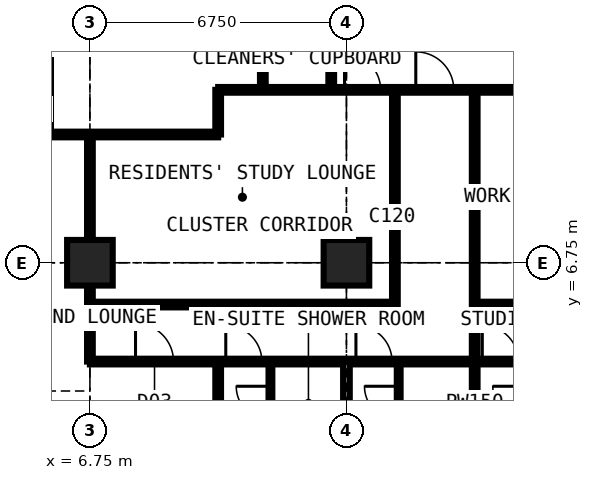
"""IFC4 building model, lengths in metres.
Left out: names, types, materials, properties, quantities, classifications, styles, units other than length and angle.
Written with IfcOpenShell. Run it as: python <this file> out.ifc"""

import sys

from ifc_helpers import new_model, si_unit, direction, frame, frame_2d, origin, origin_2d, place, context, subcontext, project, spatial, rectangle, extrude, element, fill, save


model = new_model("IFC4")
c1 = context("Model", 3, precision=1e-05, world=origin(), true_north=direction((0.0, 1.0)))
c2 = subcontext(c1, "Body", "Model", "MODEL_VIEW")
j1 = project(units=[si_unit("LENGTHUNIT", "METRE"), si_unit("PLANEANGLEUNIT", "RADIAN")], contexts=[c1])
p1 = place(None, origin())
s1 = spatial("IfcSite", under=j1, at=p1, CompositionType="ELEMENT")
p2 = place(p1, origin())
s2 = spatial("IfcBuilding", under=s1, at=p2, CompositionType="ELEMENT")
p3 = place(p2, frame((0.0, 0.0, 185.4)))
s3 = spatial("IfcBuildingStorey", under=s2, at=p3, CompositionType="ELEMENT", Elevation=185.4)
for number, where, z_axis, x_axis in (
    (1, (6.75, 6.75, 0.0), (0.0, 0.0, 1.0), (1.0, 0.0, 0.0)),
    (2, (13.5, 6.75, 0.0), (0.0, 0.0, 1.0), (1.0, 0.0, 0.0)),
):
    element("IfcColumn", number, at=place(p3, frame(where, z_axis=z_axis, x_axis=x_axis)), inside=s3, PredefinedType="COLUMN", context=c2, shape_type="SweptSolid", body=[
        extrude(rectangle(XDim=1.2, YDim=1.2, at=origin_2d()), origin(), (0.0, 0.0, 1.0), 3.6),
    ])
p4 = place(p3, frame((-0.734, 10.125, 0.0), z_axis=(0.0, 0.0, 1.0), x_axis=(1.0, 0.0, 0.0)))
e3 = element("IfcWall", 3, at=p4, inside=s3, PredefinedType="PARTITIONING", context=c2, shape_type="SweptSolid", body=[
    extrude(rectangle(XDim=10.859, YDim=0.15, at=frame_2d((5.429, 0.0))), origin(), (0.0, 0.0, 1.0), 3.375),
])
p5 = place(p3, frame((6.75, 4.15, 0.0), z_axis=(0.0, 0.0, 1.0), x_axis=(0.0, 1.0, 0.0)))
e4 = element("IfcWall", 4, at=p5, inside=s3, PredefinedType="PARTITIONING", context=c2, shape_type="SweptSolid", body=[
    extrude(rectangle(XDim=5.975, YDim=0.15, at=frame_2d((2.988, 0.0))), origin(), (0.0, 0.0, 1.0), 2.877),
])
p6 = place(p3, frame((6.75, 4.15, 0.0), z_axis=(0.0, 0.0, 1.0), x_axis=(1.0, 0.0, 0.0)))
e5 = element("IfcWall", 5, at=p6, inside=s3, PredefinedType="PARTITIONING", context=c2, shape_type="SweptSolid", body=[
    extrude(rectangle(XDim=20.25, YDim=0.15, at=frame_2d((10.125, 0.0))), origin(), (0.0, 0.0, 1.0), 3.375),
])
p7 = place(p6, frame((1.2, 0.0, 0.0)))
e6 = element("IfcOpeningElement", 6, at=p7, cuts=e5, PredefinedType="OPENING", context=c2, shape_type="SweptSolid", body=[
    extrude(rectangle(XDim=1.0, YDim=2.2, at=frame_2d((0.5, 1.1))), frame((0.0, 0.085, 0.0), z_axis=(0.0, -1.0, 0.0), x_axis=(1.0, 0.0, 0.0)), (0.0, 0.0, 1.0), 0.17),
])
p8 = place(p6, frame((3.575, 0.0, 0.0)))
e7 = element("IfcOpeningElement", 7, at=p8, cuts=e5, PredefinedType="OPENING", context=c2, shape_type="SweptSolid", body=[
    extrude(rectangle(XDim=0.95, YDim=2.2, at=frame_2d((0.475, 1.1))), frame((0.0, 0.085, 0.0), z_axis=(0.0, -1.0, 0.0), x_axis=(1.0, 0.0, 0.0)), (0.0, 0.0, 1.0), 0.17),
])
p9 = place(p6, frame((7.0, 0.0, 0.0)))
e8 = element("IfcOpeningElement", 8, at=p9, cuts=e5, PredefinedType="OPENING", context=c2, shape_type="SweptSolid", body=[
    extrude(rectangle(XDim=0.95, YDim=2.2, at=frame_2d((0.475, 1.1))), frame((0.0, 0.085, 0.0), z_axis=(0.0, -1.0, 0.0), x_axis=(1.0, 0.0, 0.0)), (0.0, 0.0, 1.0), 0.17),
])
p10 = place(p6, frame((10.325, 0.0, 0.0)))
e9 = element("IfcOpeningElement", 9, at=p10, cuts=e5, PredefinedType="OPENING", context=c2, shape_type="SweptSolid", body=[
    extrude(rectangle(XDim=0.95, YDim=2.2, at=frame_2d((0.475, 1.1))), frame((0.0, 0.085, 0.0), z_axis=(0.0, -1.0, 0.0), x_axis=(1.0, 0.0, 0.0)), (0.0, 0.0, 1.0), 0.17),
])
p11 = place(p6, frame((13.75, 0.0, 0.0)))
e10 = element("IfcOpeningElement", 10, at=p11, cuts=e5, PredefinedType="OPENING", context=c2, shape_type="SweptSolid", body=[
    extrude(rectangle(XDim=0.95, YDim=2.2, at=frame_2d((0.475, 1.1))), frame((0.0, 0.085, 0.0), z_axis=(0.0, -1.0, 0.0), x_axis=(1.0, 0.0, 0.0)), (0.0, 0.0, 1.0), 0.17),
])
p12 = place(p6, frame((17.125, 0.0, 0.0)))
e11 = element("IfcOpeningElement", 11, at=p12, cuts=e5, PredefinedType="OPENING", context=c2, shape_type="SweptSolid", body=[
    extrude(rectangle(XDim=0.95, YDim=2.2, at=frame_2d((0.475, 1.1))), frame((0.0, 0.085, 0.0), z_axis=(0.0, -1.0, 0.0), x_axis=(1.0, 0.0, 0.0)), (0.0, 0.0, 1.0), 0.17),
])
p13 = place(p3, frame((6.75, 5.65, 0.0), z_axis=(0.0, 0.0, 1.0), x_axis=(1.0, 0.0, 0.0)))
e12 = element("IfcWall", 12, at=p13, inside=s3, PredefinedType="PARTITIONING", context=c2, shape_type="SweptSolid", body=[
    extrude(rectangle(XDim=8.025, YDim=0.15, at=frame_2d((4.012, 0.0))), origin(), (0.0, 0.0, 1.0), 3.375),
])
p14 = place(p3, frame((10.125, -0.734, 0.0), z_axis=(0.0, 0.0, 1.0), x_axis=(0.0, 1.0, 0.0)))
e13 = element("IfcWall", 13, at=p14, inside=s3, PredefinedType="PARTITIONING", context=c2, shape_type="SweptSolid", body=[
    extrude(rectangle(XDim=4.884, YDim=0.15, at=frame_2d((2.442, 0.0))), origin(), (0.0, 0.0, 1.0), 3.375),
])
p15 = place(p3, frame((10.125, 10.125, 0.0), z_axis=(0.0, 0.0, 1.0), x_axis=(0.0, 1.0, 0.0)))
e14 = element("IfcWall", 14, at=p15, inside=s3, PredefinedType="PARTITIONING", context=c2, shape_type="SweptSolid", body=[
    extrude(rectangle(XDim=1.175, YDim=0.15, at=frame_2d((0.587, 0.0))), origin(), (0.0, 0.0, 1.0), 3.375),
])
p16 = place(p3, frame((10.125, 11.3, 0.0), z_axis=(0.0, 0.0, 1.0), x_axis=(1.0, 0.0, 0.0)))
e15 = element("IfcWall", 15, at=p16, inside=s3, PredefinedType="PARTITIONING", context=c2, shape_type="SweptSolid", body=[
    extrude(rectangle(XDim=20.25, YDim=0.15, at=frame_2d((10.125, 0.0))), origin(), (0.0, 0.0, 1.0), 3.375),
])
p17 = place(p16, frame((5.2, 0.0, 0.0)))
e16 = element("IfcOpeningElement", 16, at=p17, cuts=e15, PredefinedType="OPENING", context=c2, shape_type="SweptSolid", body=[
    extrude(rectangle(XDim=1.0, YDim=2.2, at=frame_2d((0.5, 1.1))), frame((0.0, 0.085, 0.0), z_axis=(0.0, -1.0, 0.0), x_axis=(1.0, 0.0, 0.0)), (0.0, 0.0, 1.0), 0.17),
])
p18 = place(p16, frame((11.312, 0.0, 0.0)))
e17 = element("IfcOpeningElement", 17, at=p18, cuts=e15, PredefinedType="OPENING", context=c2, shape_type="SweptSolid", body=[
    extrude(rectangle(XDim=1.0, YDim=2.2, at=frame_2d((0.5, 1.1))), frame((0.0, 0.085, 0.0), z_axis=(0.0, -1.0, 0.0), x_axis=(1.0, 0.0, 0.0)), (0.0, 0.0, 1.0), 0.17),
])
p19 = place(p16, frame((3.325, 0.0, 0.0)))
e18 = element("IfcOpeningElement", 18, at=p19, cuts=e15, PredefinedType="OPENING", context=c2, shape_type="SweptSolid", body=[
    extrude(rectangle(XDim=0.95, YDim=2.2, at=frame_2d((0.475, 1.1))), frame((0.0, 0.085, 0.0), z_axis=(0.0, -1.0, 0.0), x_axis=(1.0, 0.0, 0.0)), (0.0, 0.0, 1.0), 0.17),
])
p20 = place(p3, frame((11.3, 11.3, 0.0), z_axis=(0.0, 0.0, 1.0), x_axis=(0.0, 1.0, 0.0)))
e19 = element("IfcWall", 19, at=p20, inside=s3, PredefinedType="PARTITIONING", context=c2, shape_type="SweptSolid", body=[
    extrude(rectangle(XDim=19.3, YDim=0.15, at=frame_2d((9.65, 0.0))), origin(), (0.0, 0.0, 1.0), 3.375),
])
p21 = place(p20, frame((18.1, 0.0, 0.0)))
e20 = element("IfcOpeningElement", 20, at=p21, cuts=e19, PredefinedType="OPENING", context=c2, shape_type="SweptSolid", body=[
    extrude(rectangle(XDim=1.0, YDim=2.2, at=frame_2d((0.5, 1.1))), frame((0.0, 0.085, 0.0), z_axis=(0.0, -1.0, 0.0), x_axis=(1.0, 0.0, 0.0)), (0.0, 0.0, 1.0), 0.17),
])
p22 = place(p20, frame((10.137, 0.0, 0.0)))
e21 = element("IfcOpeningElement", 21, at=p22, cuts=e19, PredefinedType="OPENING", context=c2, shape_type="SweptSolid", body=[
    extrude(rectangle(XDim=1.0, YDim=2.2, at=frame_2d((0.5, 1.1))), frame((0.0, 0.085, 0.0), z_axis=(0.0, -1.0, 0.0), x_axis=(1.0, 0.0, 0.0)), (0.0, 0.0, 1.0), 0.17),
])
p23 = place(p3, frame((11.5, 1.95, 0.0), z_axis=(0.0, 0.0, 1.0), x_axis=(0.0, 1.0, 0.0)))
e22 = element("IfcWall", 22, at=p23, inside=s3, PredefinedType="PARTITIONING", context=c2, shape_type="SweptSolid", body=[
    extrude(rectangle(XDim=2.2, YDim=0.1, at=frame_2d((1.1, 0.0))), origin(), (0.0, 0.0, 1.0), 3.375),
])
p24 = place(p23, frame((0.65, 0.0, 0.0)))
e23 = element("IfcOpeningElement", 23, at=p24, cuts=e22, PredefinedType="OPENING", context=c2, shape_type="SweptSolid", body=[
    extrude(rectangle(XDim=0.9, YDim=2.2, at=frame_2d((0.45, 1.1))), frame((0.0, 0.06, 0.0), z_axis=(0.0, -1.0, 0.0), x_axis=(1.0, 0.0, 0.0)), (0.0, 0.0, 1.0), 0.12),
])
p25 = place(p3, frame((13.1, 11.3, 0.0), z_axis=(0.0, 0.0, 1.0), x_axis=(0.0, 1.0, 0.0)))
e24 = element("IfcWall", 24, at=p25, inside=s3, PredefinedType="PARTITIONING", context=c2, shape_type="SweptSolid", body=[
    extrude(rectangle(XDim=1.6, YDim=0.15, at=frame_2d((0.8, 0.0))), origin(), (0.0, 0.0, 1.0), 3.375),
])
p26 = place(p3, frame((13.5, -0.734, 0.0), z_axis=(0.0, 0.0, 1.0), x_axis=(0.0, 1.0, 0.0)))
e25 = element("IfcWall", 25, at=p26, inside=s3, PredefinedType="PARTITIONING", context=c2, shape_type="SweptSolid", body=[
    extrude(rectangle(XDim=4.884, YDim=0.175, at=frame_2d((2.442, 0.0))), origin(), (0.0, 0.0, 1.0), 2.877),
])
p27 = place(p3, frame((14.775, 5.65, 0.0), z_axis=(0.0, 0.0, 1.0), x_axis=(0.0, 1.0, 0.0)))
e26 = element("IfcWall", 26, at=p27, inside=s3, PredefinedType="PARTITIONING", context=c2, shape_type="SweptSolid", body=[
    extrude(rectangle(XDim=5.65, YDim=0.15, at=frame_2d((2.825, 0.0))), origin(), (0.0, 0.0, 1.0), 3.375),
])
p28 = place(p3, frame((14.875, 1.95, 0.0), z_axis=(0.0, 0.0, 1.0), x_axis=(0.0, 1.0, 0.0)))
e27 = element("IfcWall", 27, at=p28, inside=s3, PredefinedType="PARTITIONING", context=c2, shape_type="SweptSolid", body=[
    extrude(rectangle(XDim=2.2, YDim=0.1, at=frame_2d((1.1, 0.0))), origin(), (0.0, 0.0, 1.0), 3.375),
])
p29 = place(p28, frame((0.65, 0.0, 0.0)))
e28 = element("IfcOpeningElement", 28, at=p29, cuts=e27, PredefinedType="OPENING", context=c2, shape_type="SweptSolid", body=[
    extrude(rectangle(XDim=0.9, YDim=2.2, at=frame_2d((0.45, 1.1))), frame((0.0, 0.06, 0.0), z_axis=(0.0, -1.0, 0.0), x_axis=(1.0, 0.0, 0.0)), (0.0, 0.0, 1.0), 0.12),
])
p30 = place(p3, frame((16.875, -0.734, 0.0), z_axis=(0.0, 0.0, 1.0), x_axis=(0.0, 1.0, 0.0)))
e29 = element("IfcWall", 29, at=p30, inside=s3, PredefinedType="PARTITIONING", context=c2, shape_type="SweptSolid", body=[
    extrude(rectangle(XDim=12.034, YDim=0.15, at=frame_2d((6.017, 0.0))), origin(), (0.0, 0.0, 1.0), 3.375),
])
p31 = place(p3, frame((16.875, 5.65, 0.0), z_axis=(0.0, 0.0, 1.0), x_axis=(1.0, 0.0, 0.0)))
e30 = element("IfcWall", 30, at=p31, inside=s3, PredefinedType="PARTITIONING", context=c2, shape_type="SweptSolid", body=[
    extrude(rectangle(XDim=4.012, YDim=0.15, at=frame_2d((2.006, 0.0))), origin(), (0.0, 0.0, 1.0), 3.375),
])
p32 = place(p7, origin())
e31 = element("IfcDoor", 31, at=p32, inside=s3, OperationType="SINGLE_SWING_LEFT", PredefinedType="DOOR", context=c2, shape_type="SweptSolid", body=[
    extrude(rectangle(XDim=1.0, YDim=2.2, at=frame_2d((0.5, 1.1))), frame((0.0, 0.025, 0.0), z_axis=(0.0, -1.0, 0.0), x_axis=(1.0, 0.0, 0.0)), (0.0, 0.0, 1.0), 0.05),
])
fill(e6, e31)
p33 = place(p8, origin())
e32 = element("IfcDoor", 32, at=p33, inside=s3, OperationType="SINGLE_SWING_LEFT", PredefinedType="DOOR", context=c2, shape_type="SweptSolid", body=[
    extrude(rectangle(XDim=0.95, YDim=2.2, at=frame_2d((0.475, 1.1))), frame((0.0, 0.025, 0.0), z_axis=(0.0, -1.0, 0.0), x_axis=(1.0, 0.0, 0.0)), (0.0, 0.0, 1.0), 0.05),
])
fill(e7, e32)
p34 = place(p24, origin())
e33 = element("IfcDoor", 33, at=p34, inside=s3, OperationType="SINGLE_SWING_RIGHT", PredefinedType="DOOR", context=c2, shape_type="SweptSolid", body=[
    extrude(rectangle(XDim=0.9, YDim=2.2, at=frame_2d((0.45, 1.1))), frame((0.0, 0.025, 0.0), z_axis=(0.0, -1.0, 0.0), x_axis=(1.0, 0.0, 0.0)), (0.0, 0.0, 1.0), 0.05),
])
fill(e23, e33)
p35 = place(p9, origin())
e34 = element("IfcDoor", 34, at=p35, inside=s3, OperationType="SINGLE_SWING_LEFT", PredefinedType="DOOR", context=c2, shape_type="SweptSolid", body=[
    extrude(rectangle(XDim=0.95, YDim=2.2, at=frame_2d((0.475, 1.1))), frame((0.0, 0.025, 0.0), z_axis=(0.0, -1.0, 0.0), x_axis=(1.0, 0.0, 0.0)), (0.0, 0.0, 1.0), 0.05),
])
fill(e8, e34)
p36 = place(p29, origin())
e35 = element("IfcDoor", 35, at=p36, inside=s3, OperationType="SINGLE_SWING_RIGHT", PredefinedType="DOOR", context=c2, shape_type="SweptSolid", body=[
    extrude(rectangle(XDim=0.9, YDim=2.2, at=frame_2d((0.45, 1.1))), frame((0.0, 0.025, 0.0), z_axis=(0.0, -1.0, 0.0), x_axis=(1.0, 0.0, 0.0)), (0.0, 0.0, 1.0), 0.05),
])
fill(e28, e35)
p37 = place(p17, origin())
e36 = element("IfcDoor", 36, at=p37, inside=s3, OperationType="SINGLE_SWING_LEFT", PredefinedType="DOOR", context=c2, shape_type="SweptSolid", body=[
    extrude(rectangle(XDim=1.0, YDim=2.2, at=frame_2d((0.5, 1.1))), frame((0.0, 0.025, 0.0), z_axis=(0.0, -1.0, 0.0), x_axis=(1.0, 0.0, 0.0)), (0.0, 0.0, 1.0), 0.05),
])
fill(e16, e36)
p38 = place(p10, origin())
e37 = element("IfcDoor", 37, at=p38, inside=s3, OperationType="SINGLE_SWING_LEFT", PredefinedType="DOOR", context=c2, shape_type="SweptSolid", body=[
    extrude(rectangle(XDim=0.95, YDim=2.2, at=frame_2d((0.475, 1.1))), frame((0.0, 0.025, 0.0), z_axis=(0.0, -1.0, 0.0), x_axis=(1.0, 0.0, 0.0)), (0.0, 0.0, 1.0), 0.05),
])
fill(e9, e37)
p39 = place(p19, origin())
e38 = element("IfcDoor", 38, at=p39, inside=s3, OperationType="SINGLE_SWING_LEFT", PredefinedType="DOOR", context=c2, shape_type="SweptSolid", body=[
    extrude(rectangle(XDim=0.95, YDim=2.2, at=frame_2d((0.475, 1.1))), frame((0.0, 0.025, 0.0), z_axis=(0.0, -1.0, 0.0), x_axis=(1.0, 0.0, 0.0)), (0.0, 0.0, 1.0), 0.05),
])
fill(e18, e38)
save(model, sys.argv[1])
